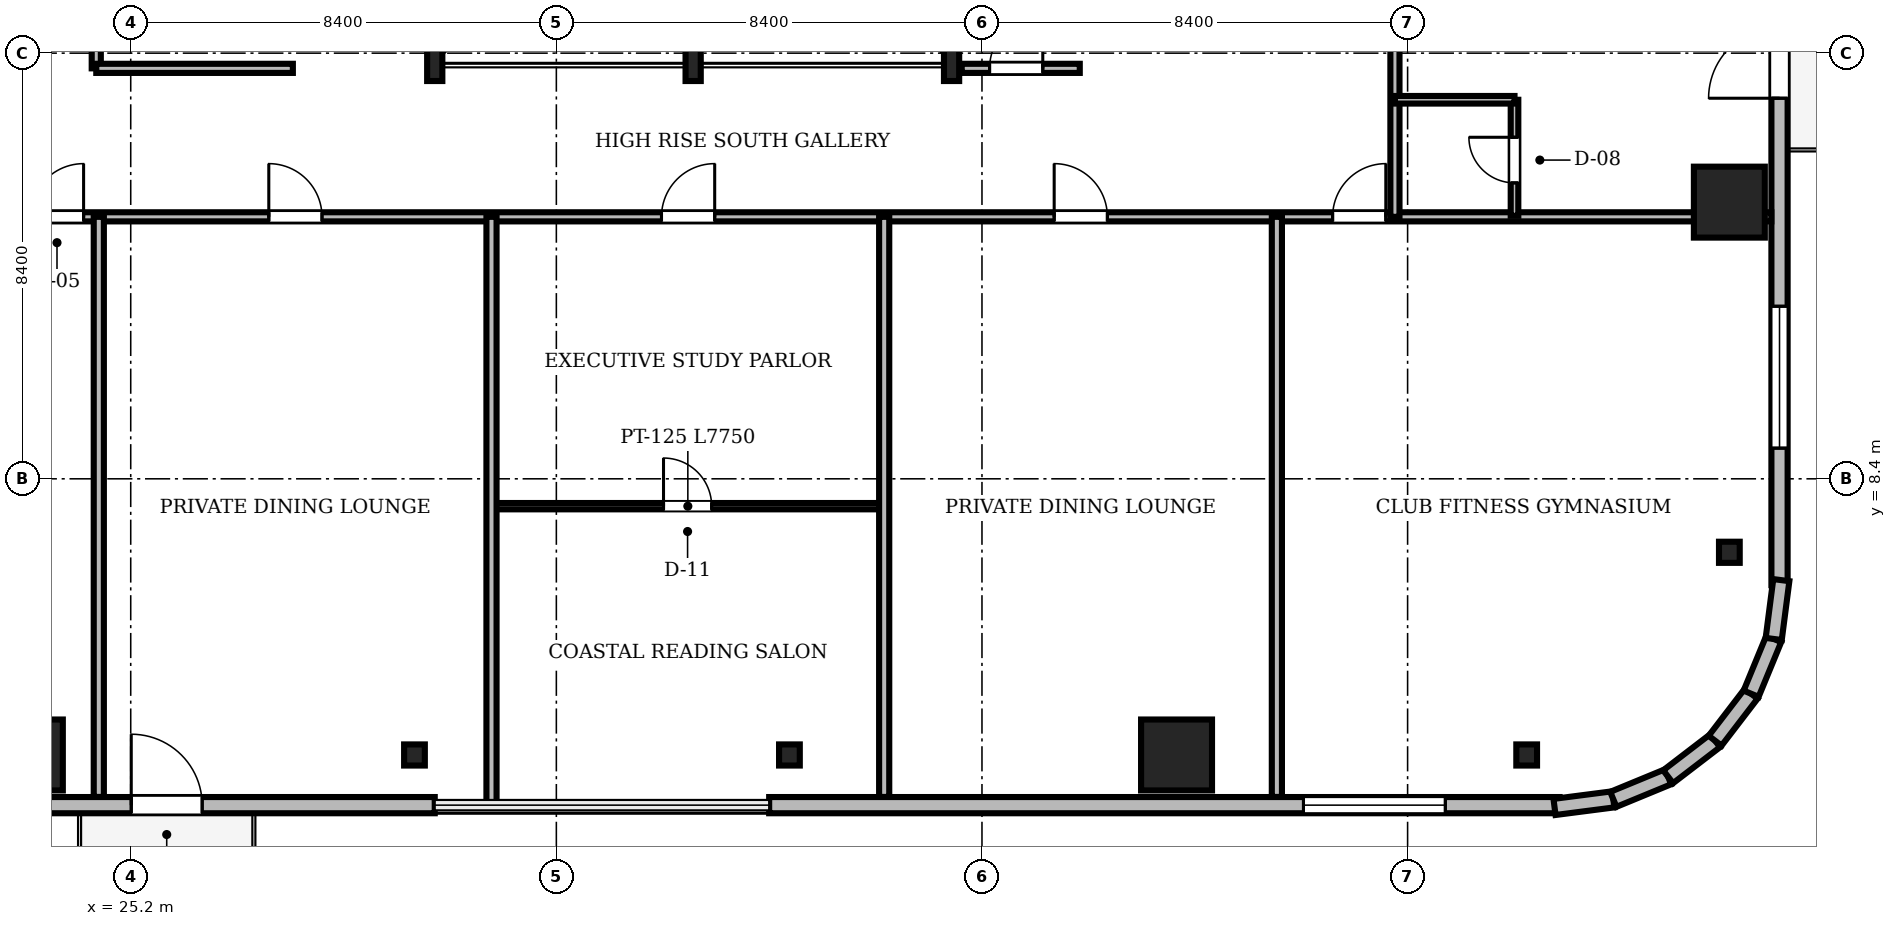
"""IFC4 building model, lengths in metres.
Left out: names, types, materials, properties, quantities, classifications, styles, units other than length and angle.
Written with IfcOpenShell. Run it as: python <this file> out.ifc"""

import sys

from ifc_helpers import new_model, si_unit, direction, frame, frame_2d, origin, origin_2d, place, context, subcontext, project, spatial, rectangle, i_section, extrude, source, transform, mapped, element, fill, save


model = new_model("IFC4")
c1 = context("Model", 3, precision=1e-05, world=origin(), true_north=direction((0.0, 1.0)))
c2 = subcontext(c1, "Body", "Model", "MODEL_VIEW")
j1 = project(units=[si_unit("LENGTHUNIT", "METRE"), si_unit("PLANEANGLEUNIT", "RADIAN")], contexts=[c1])
p1 = place(None, origin())
s1 = spatial("IfcSite", under=j1, at=p1, CompositionType="ELEMENT")
p2 = place(p1, origin())
s2 = spatial("IfcBuilding", under=s1, at=p2, CompositionType="ELEMENT")
p3 = place(p2, frame((0.0, 0.0, 188.55)))
s3 = spatial("IfcBuildingStorey", under=s2, at=p3, CompositionType="ELEMENT", Elevation=188.55)
m1 = source(origin(), c2, "Body", "SweptSolid", [
    extrude(i_section(OverallWidth=0.3, OverallDepth=0.7, WebThickness=0.017, FlangeThickness=0.032, FilletRadius=0.027, at=origin_2d()), origin(), (0.0, 0.0, 1.0), 3.53),
])
for number, where, z_axis, x_axis in (
    (1, (31.2, 16.6, 0.0), (0.0, 0.0, 1.0), (1.0, 0.0, 0.0)),
    (2, (36.3, 16.6, 0.0), (0.0, 0.0, 1.0), (1.0, 0.0, 0.0)),
    (3, (41.4, 16.6, 0.0), (0.0, 0.0, 1.0), (1.0, 0.0, 0.0)),
):
    element("IfcColumn", number, at=place(p3, frame(where, z_axis=z_axis, x_axis=x_axis)), inside=s3, PredefinedType="COLUMN", context=c2, shape_type="MappedRepresentation", body=[
        mapped(m1, transform((0.0, 0.0, 0.0), scale=1.0)),
    ])
m2 = source(origin(), c2, "Body", "SweptSolid", [
    extrude(rectangle(XDim=1.4, YDim=1.4, at=origin_2d()), origin(), (0.0, 0.0, 1.0), 3.53),
])
for number, where, z_axis, x_axis in (
    (4, (23.16, 2.95, 0.0), (0.0, 0.0, 1.0), (1.0, 0.0, 0.0)),
    (5, (45.84, 2.95, 0.0), (0.0, 0.0, 1.0), (1.0, 0.0, 0.0)),
    (6, (56.75, 13.86, 0.0), (0.0, 0.0, 1.0), (1.0, 0.0, 0.0)),
):
    element("IfcColumn", number, at=place(p3, frame(where, z_axis=z_axis, x_axis=x_axis)), inside=s3, PredefinedType="COLUMN", context=c2, shape_type="MappedRepresentation", body=[
        mapped(m2, transform((0.0, 0.0, 0.0), scale=1.0)),
    ])
m3 = source(origin(), c2, "Body", "SweptSolid", [
    extrude(i_section(OverallWidth=0.409, OverallDepth=0.417, WebThickness=0.021, FlangeThickness=0.033, FilletRadius=0.015, at=origin_2d()), origin(), (0.0, 0.0, 1.0), 3.53),
])
for number, where, z_axis, x_axis in (
    (7, (30.8, 2.95, 0.0), (0.0, 0.0, 1.0), (1.0, 0.0, 0.0)),
    (8, (38.2, 2.95, 0.0), (0.0, 0.0, 1.0), (1.0, 0.0, 0.0)),
    (9, (52.75, 2.95, 0.0), (0.0, 0.0, 1.0), (1.0, 0.0, 0.0)),
    (10, (56.75, 6.95, 0.0), (0.0, 0.0, 1.0), (1.0, 0.0, 0.0)),
):
    element("IfcColumn", number, at=place(p3, frame(where, z_axis=z_axis, x_axis=x_axis)), inside=s3, PredefinedType="COLUMN", context=c2, shape_type="MappedRepresentation", body=[
        mapped(m3, transform((0.0, 0.0, 0.0), scale=1.0)),
    ])
m4 = source(origin(), c2, "Body", "SweptSolid", [
    extrude(rectangle(XDim=15.6, YDim=0.32, at=frame_2d((7.8, 0.0))), origin(), (0.0, 0.0, 1.0), 3.53),
])
p4 = place(p3, frame((15.6, 1.96, 0.0), z_axis=(0.0, 0.0, 1.0), x_axis=(1.0, 0.0, 0.0)))
e11 = element("IfcWall", 11, at=p4, inside=s3, PredefinedType="SOLIDWALL", context=c2, shape_type="MappedRepresentation", body=[
    mapped(m4, transform((0.0, 0.0, 0.0), scale=1.0)),
])
m5 = source(origin(), c2, "Body", "SweptSolid", [
    extrude(rectangle(XDim=1.4, YDim=2.3, at=frame_2d((0.7, 1.15))), frame((0.0, 0.17, 0.0), z_axis=(0.0, -1.0, 0.0), x_axis=(1.0, 0.0, 0.0)), (0.0, 0.0, 1.0), 0.34),
])
p5 = place(p4, frame((9.61, 0.0, 0.0)))
e12 = element("IfcOpeningElement", 12, at=p5, cuts=e11, PredefinedType="OPENING", context=c2, shape_type="MappedRepresentation", body=[
    mapped(m5, transform((0.0, 0.0, 0.0), scale=1.0)),
])
m6 = source(origin(), c2, "Body", "SweptSolid", [
    extrude(rectangle(XDim=2.8, YDim=2.4, at=frame_2d((1.4, 1.2))), frame((0.0, 0.17, 0.0), z_axis=(0.0, -1.0, 0.0), x_axis=(1.0, 0.0, 0.0)), (0.0, 0.0, 1.0), 0.34),
])
p6 = place(p4, frame((2.705, 0.0, 0.72)))
e13 = element("IfcOpeningElement", 13, at=p6, cuts=e11, PredefinedType="OPENING", context=c2, shape_type="MappedRepresentation", body=[
    mapped(m6, transform((0.0, 0.0, 0.0), scale=1.0)),
])
p7 = place(p3, frame((37.8, 1.96, 0.0), z_axis=(0.0, 0.0, 1.0), x_axis=(1.0, 0.0, 0.0)))
e14 = element("IfcWall", 14, at=p7, inside=s3, PredefinedType="SOLIDWALL", context=c2, shape_type="MappedRepresentation", body=[
    mapped(m4, transform((0.0, 0.0, 0.0), scale=1.0)),
])
p8 = place(p7, frame((10.545, 0.0, 0.72)))
e15 = element("IfcOpeningElement", 15, at=p8, cuts=e14, PredefinedType="OPENING", context=c2, shape_type="MappedRepresentation", body=[
    mapped(m6, transform((0.0, 0.0, 0.0), scale=1.0)),
])
p9 = place(p3, frame((57.74, 6.3, 0.0), z_axis=(0.0, 0.0, 1.0), x_axis=(0.0, 1.0, 0.0)))
e16 = element("IfcWall", 16, at=p9, inside=s3, PredefinedType="SOLIDWALL", context=c2, shape_type="MappedRepresentation", body=[
    mapped(m4, transform((0.0, 0.0, 0.0), scale=1.0)),
])
p10 = place(p9, frame((9.61, 0.0, 0.0)))
e17 = element("IfcOpeningElement", 17, at=p10, cuts=e16, PredefinedType="OPENING", context=c2, shape_type="MappedRepresentation", body=[
    mapped(m5, transform((0.0, 0.0, 0.0), scale=1.0)),
])
p11 = place(p9, frame((2.705, 0.0, 0.72)))
e18 = element("IfcOpeningElement", 18, at=p11, cuts=e16, PredefinedType="OPENING", context=c2, shape_type="MappedRepresentation", body=[
    mapped(m6, transform((0.0, 0.0, 0.0), scale=1.0)),
])
m7 = source(origin(), c2, "Body", "SweptSolid", [
    extrude(rectangle(XDim=1.17, YDim=0.32, at=frame_2d((0.585, 0.0))), origin(), (0.0, 0.0, 1.0), 3.53),
])
p12 = place(p3, frame((53.3, 1.925, 0.0), z_axis=(0.0, 0.0, 1.0), x_axis=(0.991762485493, 0.128090485085, 0.0)))
e19 = element("IfcWall", 19, at=p12, inside=s3, PredefinedType="SOLIDWALL", context=c2, shape_type="MappedRepresentation", body=[
    mapped(m7, transform((0.0, 0.0, 0.0), scale=1.0)),
])
m8 = source(origin(), c2, "Body", "SweptSolid", [
    extrude(rectangle(XDim=1.169, YDim=0.32, at=frame_2d((0.585, 0.0))), origin(), (0.0, 0.0, 1.0), 3.53),
])
p13 = place(p3, frame((54.46, 2.074, 0.0), z_axis=(0.0, 0.0, 1.0), x_axis=(0.924479075121, 0.381232789334, 0.0)))
e20 = element("IfcWall", 20, at=p13, inside=s3, PredefinedType="SOLIDWALL", context=c2, shape_type="MappedRepresentation", body=[
    mapped(m8, transform((0.0, 0.0, 0.0), scale=1.0)),
])
m9 = source(origin(), c2, "Body", "SweptSolid", [
    extrude(rectangle(XDim=1.169, YDim=0.32, at=frame_2d((0.584, 0.0))), origin(), (0.0, 0.0, 1.0), 3.53),
])
p14 = place(p3, frame((55.541, 2.52, 0.0), z_axis=(0.0, 0.0, 1.0), x_axis=(0.793663520347, 0.608356981114, 0.0)))
e21 = element("IfcWall", 21, at=p14, inside=s3, PredefinedType="SOLIDWALL", context=c2, shape_type="MappedRepresentation", body=[
    mapped(m9, transform((0.0, 0.0, 0.0), scale=1.0)),
])
m10 = source(origin(), c2, "Body", "SweptSolid", [
    extrude(rectangle(XDim=1.169, YDim=0.32, at=frame_2d((0.584, 0.0))), origin(), (0.0, 0.0, 1.0), 3.53),
])
for number, where, z_axis, x_axis in (
    (22, (56.469, 3.231, 0.0), (0.0, 0.0, 1.0), (0.608, 0.794, 0.0)),
    (23, (57.18, 4.159, 0.0), (0.0, 0.0, 1.0), (0.381, 0.925, 0.0)),
):
    element("IfcWall", number, at=place(p3, frame(where, z_axis=z_axis, x_axis=x_axis)), inside=s3, PredefinedType="SOLIDWALL", context=c2, shape_type="MappedRepresentation", body=[
        mapped(m10, transform((0.0, 0.0, 0.0), scale=1.0)),
    ])
m11 = source(origin(), c2, "Body", "SweptSolid", [
    extrude(rectangle(XDim=1.171, YDim=0.32, at=frame_2d((0.585, 0.0))), origin(), (0.0, 0.0, 1.0), 3.53),
])
p15 = place(p3, frame((57.625, 5.24, 0.0), z_axis=(0.0, 0.0, 1.0), x_axis=(0.128269133229, 0.991739395941, 0.0)))
e24 = element("IfcWall", 24, at=p15, inside=s3, PredefinedType="SOLIDWALL", context=c2, shape_type="MappedRepresentation", body=[
    mapped(m11, transform((0.0, 0.0, 0.0), scale=1.0)),
])
m12 = source(origin(), c2, "Body", "SweptSolid", [
    extrude(rectangle(XDim=46.156, YDim=0.18, at=frame_2d((23.078, 0.0))), origin(), (0.0, 0.0, 1.0), 2.772),
])
p16 = place(p3, frame((11.422, 13.57, 0.0), z_axis=(0.0, 0.0, 1.0), x_axis=(1.0, 0.0, 0.0)))
e25 = element("IfcWall", 25, at=p16, inside=s3, PredefinedType="PARTITIONING", context=c2, shape_type="MappedRepresentation", body=[
    mapped(m12, transform((0.0, 0.0, 0.0), scale=1.0)),
])
m13 = source(origin(), c2, "Body", "SweptSolid", [
    extrude(rectangle(XDim=1.05, YDim=2.2, at=frame_2d((0.525, 1.1))), frame((0.0, 0.1, 0.0), z_axis=(0.0, -1.0, 0.0), x_axis=(1.0, 0.0, 0.0)), (0.0, 0.0, 1.0), 0.2),
])
p17 = place(p16, frame((11.798, 0.0, 0.0)))
e26 = element("IfcOpeningElement", 26, at=p17, cuts=e25, PredefinedType="OPENING", context=c2, shape_type="MappedRepresentation", body=[
    mapped(m13, transform((0.0, 0.0, 0.0), scale=1.0)),
])
p18 = place(p16, frame((16.503, 0.0, 0.0)))
e27 = element("IfcOpeningElement", 27, at=p18, cuts=e25, PredefinedType="OPENING", context=c2, shape_type="MappedRepresentation", body=[
    mapped(m13, transform((0.0, 0.0, 0.0), scale=1.0)),
])
p19 = place(p16, frame((24.253, 0.0, 0.0)))
e28 = element("IfcOpeningElement", 28, at=p19, cuts=e25, PredefinedType="OPENING", context=c2, shape_type="MappedRepresentation", body=[
    mapped(m13, transform((0.0, 0.0, 0.0), scale=1.0)),
])
p20 = place(p16, frame((32.003, 0.0, 0.0)))
e29 = element("IfcOpeningElement", 29, at=p20, cuts=e25, PredefinedType="OPENING", context=c2, shape_type="MappedRepresentation", body=[
    mapped(m13, transform((0.0, 0.0, 0.0), scale=1.0)),
])
p21 = place(p16, frame((37.498, 0.0, 0.0)))
e30 = element("IfcOpeningElement", 30, at=p21, cuts=e25, PredefinedType="OPENING", context=c2, shape_type="MappedRepresentation", body=[
    mapped(m13, transform((0.0, 0.0, 0.0), scale=1.0)),
])
m14 = source(origin(), c2, "Body", "SweptSolid", [
    extrude(rectangle(XDim=27.53, YDim=0.18, at=frame_2d((13.765, 0.0))), origin(), (0.0, 0.0, 1.0), 2.972),
])
p22 = place(p3, frame((50.15, 13.57, 0.0), z_axis=(0.0, 0.0, 1.0), x_axis=(0.0, 1.0, 0.0)))
e31 = element("IfcWall", 31, at=p22, inside=s3, PredefinedType="PARTITIONING", context=c2, shape_type="MappedRepresentation", body=[
    mapped(m14, transform((0.0, 0.0, 0.0), scale=1.0)),
])
p23 = place(p22, frame((5.217, 0.0, 0.0)))
e32 = element("IfcOpeningElement", 32, at=p23, cuts=e31, PredefinedType="OPENING", context=c2, shape_type="MappedRepresentation", body=[
    mapped(m13, transform((0.0, 0.0, 0.0), scale=1.0)),
])
p24 = place(p22, frame((14.32, 0.0, 0.0)))
e33 = element("IfcOpeningElement", 33, at=p24, cuts=e31, PredefinedType="OPENING", context=c2, shape_type="MappedRepresentation", body=[
    mapped(m13, transform((0.0, 0.0, 0.0), scale=1.0)),
])
p25 = place(p22, frame((23.423, 0.0, 0.0)))
e34 = element("IfcOpeningElement", 34, at=p25, cuts=e31, PredefinedType="OPENING", context=c2, shape_type="MappedRepresentation", body=[
    mapped(m13, transform((0.0, 0.0, 0.0), scale=1.0)),
])
m15 = source(origin(), c2, "Body", "SweptSolid", [
    extrude(rectangle(XDim=11.94, YDim=0.18, at=frame_2d((5.97, 0.0))), origin(), (0.0, 0.0, 1.0), 2.972),
])
p26 = place(p3, frame((24.52, 16.5, 0.0), z_axis=(0.0, 0.0, 1.0), x_axis=(0.0, 1.0, 0.0)))
e35 = element("IfcWall", 35, at=p26, inside=s3, PredefinedType="PARTITIONING", context=c2, shape_type="MappedRepresentation", body=[
    mapped(m15, transform((0.0, 0.0, 0.0), scale=1.0)),
])
p27 = place(p26, frame((4.5, 0.0, 0.0)))
e36 = element("IfcOpeningElement", 36, at=p27, cuts=e35, PredefinedType="OPENING", context=c2, shape_type="MappedRepresentation", body=[
    mapped(m13, transform((0.0, 0.0, 0.0), scale=1.0)),
])
m16 = source(origin(), c2, "Body", "SweptSolid", [
    extrude(rectangle(XDim=7.75, YDim=0.125, at=frame_2d((3.875, 0.0))), origin(), (0.0, 0.0, 1.0), 2.972),
])
p28 = place(p3, frame((32.32, 7.86, 0.0), z_axis=(0.0, 0.0, 1.0), x_axis=(1.0, 0.0, 0.0)))
e37 = element("IfcWall", 37, at=p28, inside=s3, PredefinedType="PARTITIONING", context=c2, shape_type="MappedRepresentation", body=[
    mapped(m16, transform((0.0, 0.0, 0.0), scale=1.0)),
])
m17 = source(origin(), c2, "Body", "SweptSolid", [
    extrude(rectangle(XDim=0.95, YDim=2.15, at=frame_2d((0.475, 1.075))), frame((0.0, 0.073, 0.0), z_axis=(0.0, -1.0, 0.0), x_axis=(1.0, 0.0, 0.0)), (0.0, 0.0, 1.0), 0.145),
])
p29 = place(p28, frame((3.395, 0.0, 0.0)))
e38 = element("IfcOpeningElement", 38, at=p29, cuts=e37, PredefinedType="OPENING", context=c2, shape_type="MappedRepresentation", body=[
    mapped(m17, transform((0.0, 0.0, 0.0), scale=1.0)),
])
m18 = source(origin(), c2, "Body", "SweptSolid", [
    extrude(rectangle(XDim=2.33, YDim=0.18, at=frame_2d((1.165, 0.0))), origin(), (0.0, 0.0, 1.0), 2.972),
])
p30 = place(p3, frame((41.6, 16.5, 0.0), z_axis=(0.0, 0.0, 1.0), x_axis=(1.0, 0.0, 0.0)))
e39 = element("IfcWall", 39, at=p30, inside=s3, PredefinedType="PARTITIONING", context=c2, shape_type="MappedRepresentation", body=[
    mapped(m18, transform((0.0, 0.0, 0.0), scale=1.0)),
])
p31 = place(p30, frame((0.55, 0.0, 0.0)))
e40 = element("IfcOpeningElement", 40, at=p31, cuts=e39, PredefinedType="OPENING", context=c2, shape_type="MappedRepresentation", body=[
    mapped(m13, transform((0.0, 0.0, 0.0), scale=1.0)),
])
m19 = source(origin(), c2, "Body", "SweptSolid", [
    extrude(rectangle(XDim=2.29, YDim=0.15, at=frame_2d((1.145, 0.0))), origin(), (0.0, 0.0, 1.0), 2.972),
])
p32 = place(p3, frame((52.51, 13.59, 0.0), z_axis=(0.0, 0.0, 1.0), x_axis=(0.0, 1.0, 0.0)))
e41 = element("IfcWall", 41, at=p32, inside=s3, PredefinedType="PARTITIONING", context=c2, shape_type="MappedRepresentation", body=[
    mapped(m19, transform((0.0, 0.0, 0.0), scale=1.0)),
])
m20 = source(origin(), c2, "Body", "SweptSolid", [
    extrude(rectangle(XDim=0.9, YDim=2.1, at=frame_2d((0.45, 1.05))), frame((0.0, 0.085, 0.0), z_axis=(0.0, -1.0, 0.0), x_axis=(1.0, 0.0, 0.0)), (0.0, 0.0, 1.0), 0.17),
])
p33 = place(p32, frame((0.65, 0.0, 0.0)))
e42 = element("IfcOpeningElement", 42, at=p33, cuts=e41, PredefinedType="OPENING", context=c2, shape_type="MappedRepresentation", body=[
    mapped(m20, transform((0.0, 0.0, 0.0), scale=1.0)),
])
m21 = source(origin(), c2, "Body", "SweptSolid", [
    extrude(rectangle(XDim=11.448, YDim=0.2, at=frame_2d((5.724, 0.0))), origin(), (0.0, 0.0, 1.0), 2.772),
])
p34 = place(p3, frame((24.57, 2.122, 0.0), z_axis=(0.0, 0.0, 1.0), x_axis=(0.0, 1.0, 0.0)))
e43 = element("IfcWall", 43, at=p34, inside=s3, PredefinedType="PARTITIONING", context=c2, shape_type="MappedRepresentation", body=[
    mapped(m21, transform((0.0, 0.0, 0.0), scale=1.0)),
])
m22 = source(origin(), c2, "Body", "SweptSolid", [
    extrude(rectangle(XDim=11.64, YDim=0.2, at=frame_2d((5.82, 0.0))), origin(), (0.0, 0.0, 1.0), 2.772),
])
p35 = place(p3, frame((32.32, 1.93, 0.0), z_axis=(0.0, 0.0, 1.0), x_axis=(0.0, 1.0, 0.0)))
e44 = element("IfcWall", 44, at=p35, inside=s3, PredefinedType="PARTITIONING", context=c2, shape_type="MappedRepresentation", body=[
    mapped(m22, transform((0.0, 0.0, 0.0), scale=1.0)),
])
for number, where, z_axis, x_axis in (
    (45, (40.07, 2.122, 0.0), (0.0, 0.0, 1.0), (0.0, 1.0, 0.0)),
    (46, (47.82, 2.122, 0.0), (0.0, 0.0, 1.0), (0.0, 1.0, 0.0)),
):
    element("IfcWall", number, at=place(p3, frame(where, z_axis=z_axis, x_axis=x_axis)), inside=s3, PredefinedType="PARTITIONING", context=c2, shape_type="MappedRepresentation", body=[
        mapped(m21, transform((0.0, 0.0, 0.0), scale=1.0)),
    ])
m23 = source(origin(), c2, "Body", "SweptSolid", [
    extrude(rectangle(XDim=3.88, YDim=0.18, at=frame_2d((1.94, 0.0))), origin(), (0.0, 0.0, 1.0), 3.53),
])
p36 = place(p3, frame((24.52, 16.5, 0.0), z_axis=(0.0, 0.0, 1.0), x_axis=(1.0, 0.0, 0.0)))
e47 = element("IfcWall", 47, at=p36, inside=s3, PredefinedType="PARTITIONING", context=c2, shape_type="MappedRepresentation", body=[
    mapped(m23, transform((0.0, 0.0, 0.0), scale=1.0)),
])
m24 = source(origin(), c2, "Body", "SweptSolid", [
    extrude(rectangle(XDim=2.36, YDim=0.15, at=frame_2d((1.18, 0.0))), origin(), (0.0, 0.0, 1.0), 3.53),
])
p37 = place(p3, frame((50.15, 15.88, 0.0), z_axis=(0.0, 0.0, 1.0), x_axis=(1.0, 0.0, 0.0)))
e48 = element("IfcWall", 48, at=p37, inside=s3, PredefinedType="PARTITIONING", context=c2, shape_type="MappedRepresentation", body=[
    mapped(m24, transform((0.0, 0.0, 0.0), scale=1.0)),
])
m25 = source(origin(), c2, "Body", "SweptSolid", [
    extrude(rectangle(XDim=1.4, YDim=2.3, at=frame_2d((0.7, 1.15))), frame((0.0, 0.025, 0.0), z_axis=(0.0, -1.0, 0.0), x_axis=(1.0, 0.0, 0.0)), (0.0, 0.0, 1.0), 0.05),
])
p38 = place(p5, frame((1.4, 0.0, 0.0), z_axis=(0.0, 0.0, 1.0), x_axis=(-1.0, 0.0, 0.0)))
e49 = element("IfcDoor", 49, at=p38, inside=s3, OperationType="DOUBLE_DOOR_SLIDING", PredefinedType="DOOR", context=c2, shape_type="MappedRepresentation", body=[
    mapped(m25, transform((0.0, 0.0, 0.0), scale=1.0)),
])
fill(e12, e49)
m26 = source(origin(), c2, "Body", "SweptSolid", [
    extrude(rectangle(XDim=2.8, YDim=2.4, at=frame_2d((1.4, 1.2))), frame((0.0, 0.03, 0.0), z_axis=(0.0, -1.0, 0.0), x_axis=(1.0, 0.0, 0.0)), (0.0, 0.0, 1.0), 0.06),
])
p39 = place(p8, origin())
e50 = element("IfcWindow", 50, at=p39, inside=s3, PartitioningType="SINGLE_PANEL", PredefinedType="WINDOW", context=c2, shape_type="MappedRepresentation", body=[
    mapped(m26, transform((0.0, 0.0, 0.0), scale=1.0)),
])
fill(e15, e50)
p40 = place(p10, frame((1.4, 0.0, 0.0), z_axis=(0.0, 0.0, 1.0), x_axis=(-1.0, 0.0, 0.0)))
e51 = element("IfcDoor", 51, at=p40, inside=s3, OperationType="DOUBLE_DOOR_SLIDING", PredefinedType="DOOR", context=c2, shape_type="MappedRepresentation", body=[
    mapped(m25, transform((0.0, 0.0, 0.0), scale=1.0)),
])
fill(e17, e51)
p41 = place(p11, origin())
e52 = element("IfcWindow", 52, at=p41, inside=s3, PartitioningType="SINGLE_PANEL", PredefinedType="WINDOW", context=c2, shape_type="MappedRepresentation", body=[
    mapped(m26, transform((0.0, 0.0, 0.0), scale=1.0)),
])
fill(e18, e52)
m27 = source(origin(), c2, "Body", "SweptSolid", [
    extrude(rectangle(XDim=1.05, YDim=2.2, at=frame_2d((0.525, 1.1))), frame((0.0, 0.025, 0.0), z_axis=(0.0, -1.0, 0.0), x_axis=(1.0, 0.0, 0.0)), (0.0, 0.0, 1.0), 0.05),
])
p42 = place(p17, origin())
e53 = element("IfcDoor", 53, at=p42, inside=s3, OperationType="SINGLE_SWING_RIGHT", PredefinedType="DOOR", context=c2, shape_type="MappedRepresentation", body=[
    mapped(m27, transform((0.0, 0.0, 0.0), scale=1.0)),
])
fill(e26, e53)
p43 = place(p18, origin())
e54 = element("IfcDoor", 54, at=p43, inside=s3, OperationType="SINGLE_SWING_LEFT", PredefinedType="DOOR", context=c2, shape_type="MappedRepresentation", body=[
    mapped(m27, transform((0.0, 0.0, 0.0), scale=1.0)),
])
fill(e27, e54)
p44 = place(p19, origin())
e55 = element("IfcDoor", 55, at=p44, inside=s3, OperationType="SINGLE_SWING_RIGHT", PredefinedType="DOOR", context=c2, shape_type="MappedRepresentation", body=[
    mapped(m27, transform((0.0, 0.0, 0.0), scale=1.0)),
])
fill(e28, e55)
p45 = place(p20, origin())
e56 = element("IfcDoor", 56, at=p45, inside=s3, OperationType="SINGLE_SWING_LEFT", PredefinedType="DOOR", context=c2, shape_type="MappedRepresentation", body=[
    mapped(m27, transform((0.0, 0.0, 0.0), scale=1.0)),
])
fill(e29, e56)
p46 = place(p21, origin())
e57 = element("IfcDoor", 57, at=p46, inside=s3, OperationType="SINGLE_SWING_RIGHT", PredefinedType="DOOR", context=c2, shape_type="MappedRepresentation", body=[
    mapped(m27, transform((0.0, 0.0, 0.0), scale=1.0)),
])
fill(e30, e57)
m28 = source(origin(), c2, "Body", "SweptSolid", [
    extrude(rectangle(XDim=0.95, YDim=2.15, at=frame_2d((0.475, 1.075))), frame((0.0, 0.025, 0.0), z_axis=(0.0, -1.0, 0.0), x_axis=(1.0, 0.0, 0.0)), (0.0, 0.0, 1.0), 0.05),
])
p47 = place(p29, origin())
e58 = element("IfcDoor", 58, at=p47, inside=s3, OperationType="SINGLE_SWING_LEFT", PredefinedType="DOOR", context=c2, shape_type="MappedRepresentation", body=[
    mapped(m28, transform((0.0, 0.0, 0.0), scale=1.0)),
])
fill(e38, e58)
p48 = place(p31, origin())
e59 = element("IfcDoor", 59, at=p48, inside=s3, OperationType="SINGLE_SWING_RIGHT", PredefinedType="DOOR", context=c2, shape_type="MappedRepresentation", body=[
    mapped(m27, transform((0.0, 0.0, 0.0), scale=1.0)),
])
fill(e40, e59)
m29 = source(origin(), c2, "Body", "SweptSolid", [
    extrude(rectangle(XDim=0.9, YDim=2.1, at=frame_2d((0.45, 1.05))), frame((0.0, 0.025, 0.0), z_axis=(0.0, -1.0, 0.0), x_axis=(1.0, 0.0, 0.0)), (0.0, 0.0, 1.0), 0.05),
])
p49 = place(p33, origin())
e60 = element("IfcDoor", 60, at=p49, inside=s3, OperationType="SINGLE_SWING_RIGHT", PredefinedType="DOOR", context=c2, shape_type="MappedRepresentation", body=[
    mapped(m29, transform((0.0, 0.0, 0.0), scale=1.0)),
])
fill(e42, e60)
save(model, sys.argv[1])
